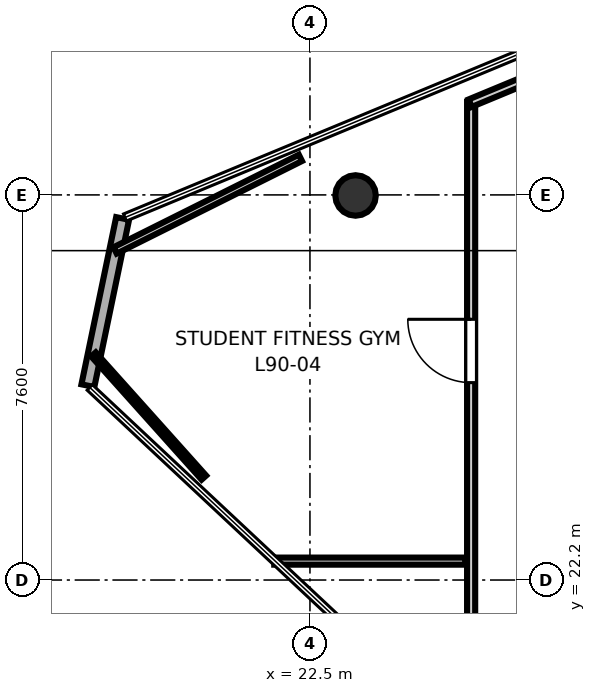
"""IFC4 building model, lengths in metres.
Left out: names, types, materials, properties, quantities, classifications, styles, units other than length and angle.
Written with IfcOpenShell. Run it as: python <this file> out.ifc"""

import sys

from ifc_helpers import new_model, si_unit, direction, frame, frame_2d, origin, origin_2d, place, context, subcontext, project, spatial, rectangle, hollow_circle, extrude, element, fill, save


model = new_model("IFC4")
c1 = context("Model", 3, precision=1e-05, world=origin(), true_north=direction((0.0, 1.0)))
c2 = subcontext(c1, "Body", "Model", "MODEL_VIEW")
j1 = project(units=[si_unit("LENGTHUNIT", "METRE"), si_unit("PLANEANGLEUNIT", "RADIAN")], contexts=[c1])
p1 = place(None, origin())
s1 = spatial("IfcSite", under=j1, at=p1, CompositionType="ELEMENT")
p2 = place(p1, origin())
s2 = spatial("IfcBuilding", under=s1, at=p2, CompositionType="ELEMENT")
p3 = place(p2, frame((0.0, 0.0, 348.1)))
s3 = spatial("IfcBuildingStorey", under=s2, at=p3, CompositionType="ELEMENT", Elevation=348.1)
p4 = place(p3, frame((23.4, 29.789, 0.0), z_axis=(0.0, 0.0, 1.0), x_axis=(1.0, 0.0, 0.0)))
e1 = element("IfcColumn", 1, at=p4, inside=s3, PredefinedType="COLUMN", context=c2, shape_type="SweptSolid", body=[
    extrude(hollow_circle(Radius=0.4, WallThickness=0.022, at=origin_2d()), origin(), (0.0, 0.0, 1.0), 3.7),
])
p5 = place(p3, frame((18.803, 29.335, 0.0), z_axis=(0.0, 0.0, 1.0), x_axis=(-0.203355362811, -0.979104997646, 0.0)))
e2 = element("IfcWall", 2, at=p5, inside=s3, PredefinedType="SOLIDWALL", context=c2, shape_type="SweptSolid", body=[
    extrude(rectangle(XDim=3.37, YDim=0.26, at=frame_2d((1.685, 0.0))), origin(), (0.0, 0.0, 1.0), 3.4),
])
p6 = place(p3, frame((25.681, 19.66, 0.0), z_axis=(0.0, 0.0, 1.0), x_axis=(0.0, 1.0, 0.0)))
e3 = element("IfcWall", 3, at=p6, inside=s3, PredefinedType="PARTITIONING", context=c2, shape_type="SweptSolid", body=[
    extrude(rectangle(XDim=11.979, YDim=0.16, at=frame_2d((5.99, 0.0))), origin(), (0.0, 0.0, 1.0), 2.35),
])
p7 = place(p6, frame((6.435, 0.0, 0.0)))
e4 = element("IfcOpeningElement", 4, at=p7, cuts=e3, PredefinedType="OPENING", context=c2, shape_type="SweptSolid", body=[
    extrude(rectangle(XDim=1.25, YDim=2.2, at=frame_2d((0.625, 1.1))), frame((0.0, 0.09, 0.0), z_axis=(0.0, -1.0, 0.0), x_axis=(1.0, 0.0, 0.0)), (0.0, 0.0, 1.0), 0.18),
])
p8 = place(p3, frame((25.662, 31.611, 0.0), z_axis=(0.0, 0.0, 1.0), x_axis=(0.923688761003, 0.38314367122, 0.0)))
e5 = element("IfcWall", 5, at=p8, inside=s3, PredefinedType="PARTITIONING", context=c2, shape_type="SweptSolid", body=[
    extrude(rectangle(XDim=2.133, YDim=0.16, at=frame_2d((1.066, 0.0))), origin(), (0.0, 0.0, 1.0), 2.35),
])
p9 = place(p3, frame((25.57, 22.573, 0.0), z_axis=(0.0, 0.0, 1.0), x_axis=(-1.0, 0.0, 0.0)))
e6 = element("IfcWall", 6, at=p9, inside=s3, PredefinedType="PARTITIONING", context=c2, shape_type="SweptSolid", body=[
    extrude(rectangle(XDim=3.775, YDim=0.14, at=frame_2d((1.887, 0.0))), origin(), (0.0, 0.0, 1.0), 2.35),
])
p10 = place(p3, frame((20.406, 24.221, 0.0), z_axis=(0.0, 0.0, 1.0), x_axis=(-0.667227576858, 0.744853919021, 0.0)))
e7 = element("IfcWall", 7, at=p10, inside=s3, PredefinedType="PARTITIONING", context=c2, shape_type="SweptSolid", body=[
    extrude(rectangle(XDim=3.265, YDim=0.12, at=frame_2d((1.632, 0.0))), origin(), (0.0, 0.0, 1.0), 2.35),
])
p11 = place(p3, frame((18.655, 28.704, 0.0), z_axis=(0.0, 0.0, 1.0), x_axis=(0.894630165924, 0.446807415133, 0.0)))
e8 = element("IfcWall", 8, at=p11, inside=s3, PredefinedType="PARTITIONING", context=c2, shape_type="SweptSolid", body=[
    extrude(rectangle(XDim=4.088, YDim=0.14, at=frame_2d((2.044, 0.0))), origin(), (0.0, 0.0, 1.0), 2.35),
])
p12 = place(p7, origin())
e9 = element("IfcDoor", 9, at=p12, inside=s3, OperationType="SINGLE_SWING_RIGHT", PredefinedType="DOOR", context=c2, shape_type="SweptSolid", body=[
    extrude(rectangle(XDim=1.25, YDim=2.2, at=frame_2d((0.625, 1.1))), frame((0.0, 0.025, 0.0), z_axis=(0.0, -1.0, 0.0), x_axis=(1.0, 0.0, 0.0)), (0.0, 0.0, 1.0), 0.05),
])
fill(e4, e9)
save(model, sys.argv[1])
